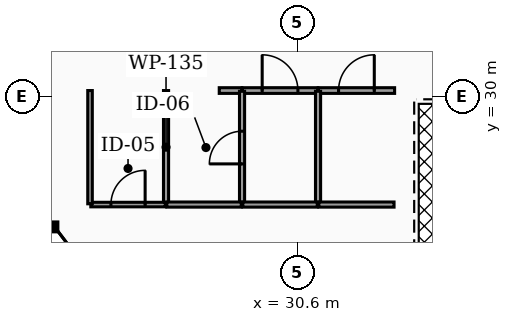
"""IFC4 building model, lengths in metres.
Left out: names, types, materials, properties, quantities, classifications, styles, units other than length and angle.
Written with IfcOpenShell. Run it as: python <this file> out.ifc"""

import sys

from ifc_helpers import new_model, si_unit, direction, frame, frame_2d, origin, place, context, subcontext, project, spatial, rectangle, extrude, element, fill, save


model = new_model("IFC4")
c1 = context("Model", 3, precision=1e-05, world=origin(), true_north=direction((0.0, 1.0)))
c2 = subcontext(c1, "Body", "Model", "MODEL_VIEW")
j1 = project(units=[si_unit("LENGTHUNIT", "METRE"), si_unit("PLANEANGLEUNIT", "RADIAN")], contexts=[c1])
p1 = place(None, origin())
s1 = spatial("IfcSite", under=j1, at=p1, CompositionType="ELEMENT")
p2 = place(p1, origin())
s2 = spatial("IfcBuilding", under=s1, at=p2, CompositionType="ELEMENT")
p3 = place(p2, frame((0.0, 0.0, 175.78)))
s3 = spatial("IfcBuildingStorey", under=s2, at=p3, CompositionType="ELEMENT", Elevation=175.78)
p4 = place(p3, frame((28.55, 30.15, 0.0), z_axis=(0.0, 0.0, 1.0), x_axis=(1.0, 0.0, 0.0)))
e1 = element("IfcWall", 1, at=p4, inside=s3, PredefinedType="PARTITIONING", context=c2, shape_type="SweptSolid", body=[
    extrude(rectangle(XDim=0.595, YDim=0.15, at=frame_2d((0.297, 0.0))), origin(), (0.0, 0.0, 1.0), 2.457),
])
p5 = place(p3, frame((29.155, 30.15, 0.0), z_axis=(0.0, 0.0, 1.0), x_axis=(1.0, 0.0, 0.0)))
e2 = element("IfcWall", 2, at=p5, inside=s3, PredefinedType="PARTITIONING", context=c2, shape_type="SweptSolid", body=[
    extrude(rectangle(XDim=1.99, YDim=0.15, at=frame_2d((0.995, 0.0))), origin(), (0.0, 0.0, 1.0), 2.457),
])
p6 = place(p5, frame((0.525, 0.0, 0.0)))
e3 = element("IfcOpeningElement", 3, at=p6, cuts=e2, PredefinedType="OPENING", context=c2, shape_type="SweptSolid", body=[
    extrude(rectangle(XDim=0.94, YDim=2.05, at=frame_2d((0.47, 1.025))), frame((0.0, 0.085, 0.0), z_axis=(0.0, -1.0, 0.0), x_axis=(1.0, 0.0, 0.0)), (0.0, 0.0, 1.0), 0.17),
])
p7 = place(p3, frame((31.155, 30.15, 0.0), z_axis=(0.0, 0.0, 1.0), x_axis=(1.0, 0.0, 0.0)))
e4 = element("IfcWall", 4, at=p7, inside=s3, PredefinedType="PARTITIONING", context=c2, shape_type="SweptSolid", body=[
    extrude(rectangle(XDim=2.01, YDim=0.15, at=frame_2d((1.005, 0.0))), origin(), (0.0, 0.0, 1.0), 2.457),
])
p8 = place(p7, frame((0.535, 0.0, 0.0)))
e5 = element("IfcOpeningElement", 5, at=p8, cuts=e4, PredefinedType="OPENING", context=c2, shape_type="SweptSolid", body=[
    extrude(rectangle(XDim=0.94, YDim=2.05, at=frame_2d((0.47, 1.025))), frame((0.0, 0.085, 0.0), z_axis=(0.0, -1.0, 0.0), x_axis=(1.0, 0.0, 0.0)), (0.0, 0.0, 1.0), 0.17),
])
p9 = place(p3, frame((27.15, 27.17, 0.0), z_axis=(0.0, 0.0, 1.0), x_axis=(0.0, 1.0, 0.0)))
e6 = element("IfcWall", 6, at=p9, inside=s3, PredefinedType="PARTITIONING", context=c2, shape_type="SweptSolid", body=[
    extrude(rectangle(XDim=2.98, YDim=0.135, at=frame_2d((1.49, 0.0))), origin(), (0.0, 0.0, 1.0), 2.457),
])
p10 = place(p3, frame((25.17, 27.15, 0.0), z_axis=(0.0, 0.0, 1.0), x_axis=(1.0, 0.0, 0.0)))
e7 = element("IfcWall", 7, at=p10, inside=s3, PredefinedType="PARTITIONING", context=c2, shape_type="SweptSolid", body=[
    extrude(rectangle(XDim=1.96, YDim=0.12, at=frame_2d((0.98, 0.0))), origin(), (0.0, 0.0, 1.0), 2.457),
])
p11 = place(p10, frame((0.53, 0.0, 0.0)))
e8 = element("IfcOpeningElement", 8, at=p11, cuts=e7, PredefinedType="OPENING", context=c2, shape_type="SweptSolid", body=[
    extrude(rectangle(XDim=0.9, YDim=2.05, at=frame_2d((0.45, 1.025))), frame((0.0, 0.07, 0.0), z_axis=(0.0, -1.0, 0.0), x_axis=(1.0, 0.0, 0.0)), (0.0, 0.0, 1.0), 0.14),
])
p12 = place(p3, frame((25.15, 27.17, 0.0), z_axis=(0.0, 0.0, 1.0), x_axis=(0.0, 1.0, 0.0)))
e9 = element("IfcWall", 9, at=p12, inside=s3, PredefinedType="PARTITIONING", context=c2, shape_type="SweptSolid", body=[
    extrude(rectangle(XDim=2.98, YDim=0.12, at=frame_2d((1.49, 0.0))), origin(), (0.0, 0.0, 1.0), 2.457),
])
p13 = place(p3, frame((29.15, 27.17, 0.0), z_axis=(0.0, 0.0, 1.0), x_axis=(0.0, 1.0, 0.0)))
e10 = element("IfcWall", 10, at=p13, inside=s3, PredefinedType="PARTITIONING", context=c2, shape_type="SweptSolid", body=[
    extrude(rectangle(XDim=2.96, YDim=0.135, at=frame_2d((1.48, 0.0))), origin(), (0.0, 0.0, 1.0), 2.457),
])
p14 = place(p13, frame((1.05, 0.0, 0.0)))
e11 = element("IfcOpeningElement", 11, at=p14, cuts=e10, PredefinedType="OPENING", context=c2, shape_type="SweptSolid", body=[
    extrude(rectangle(XDim=0.86, YDim=2.05, at=frame_2d((0.43, 1.025))), frame((0.0, 0.077, 0.0), z_axis=(0.0, -1.0, 0.0), x_axis=(1.0, 0.0, 0.0)), (0.0, 0.0, 1.0), 0.155),
])
p15 = place(p3, frame((27.17, 27.15, 0.0), z_axis=(0.0, 0.0, 1.0), x_axis=(1.0, 0.0, 0.0)))
e12 = element("IfcWall", 12, at=p15, inside=s3, PredefinedType="PARTITIONING", context=c2, shape_type="SweptSolid", body=[
    extrude(rectangle(XDim=1.96, YDim=0.135, at=frame_2d((0.98, 0.0))), origin(), (0.0, 0.0, 1.0), 2.457),
])
p16 = place(p3, frame((31.15, 27.17, 0.0), z_axis=(0.0, 0.0, 1.0), x_axis=(0.0, 1.0, 0.0)))
e13 = element("IfcWall", 13, at=p16, inside=s3, PredefinedType="PARTITIONING", context=c2, shape_type="SweptSolid", body=[
    extrude(rectangle(XDim=2.96, YDim=0.135, at=frame_2d((1.48, 0.0))), origin(), (0.0, 0.0, 1.0), 2.457),
])
p17 = place(p3, frame((29.17, 27.15, 0.0), z_axis=(0.0, 0.0, 1.0), x_axis=(1.0, 0.0, 0.0)))
e14 = element("IfcWall", 14, at=p17, inside=s3, PredefinedType="PARTITIONING", context=c2, shape_type="SweptSolid", body=[
    extrude(rectangle(XDim=1.96, YDim=0.135, at=frame_2d((0.98, 0.0))), origin(), (0.0, 0.0, 1.0), 2.457),
])
p18 = place(p3, frame((31.17, 27.15, 0.0), z_axis=(0.0, 0.0, 1.0), x_axis=(1.0, 0.0, 0.0)))
e15 = element("IfcWall", 15, at=p18, inside=s3, PredefinedType="PARTITIONING", context=c2, shape_type="SweptSolid", body=[
    extrude(rectangle(XDim=1.98, YDim=0.135, at=frame_2d((0.99, 0.0))), origin(), (0.0, 0.0, 1.0), 2.457),
])
p19 = place(p6, origin())
e16 = element("IfcDoor", 16, at=p19, inside=s3, OperationType="SINGLE_SWING_LEFT", PredefinedType="DOOR", context=c2, shape_type="SweptSolid", body=[
    extrude(rectangle(XDim=0.94, YDim=2.05, at=frame_2d((0.47, 1.025))), frame((0.0, 0.025, 0.0), z_axis=(0.0, -1.0, 0.0), x_axis=(1.0, 0.0, 0.0)), (0.0, 0.0, 1.0), 0.05),
])
fill(e3, e16)
p20 = place(p8, origin())
e17 = element("IfcDoor", 17, at=p20, inside=s3, OperationType="SINGLE_SWING_RIGHT", PredefinedType="DOOR", context=c2, shape_type="SweptSolid", body=[
    extrude(rectangle(XDim=0.94, YDim=2.05, at=frame_2d((0.47, 1.025))), frame((0.0, 0.025, 0.0), z_axis=(0.0, -1.0, 0.0), x_axis=(1.0, 0.0, 0.0)), (0.0, 0.0, 1.0), 0.05),
])
fill(e5, e17)
p21 = place(p11, origin())
e18 = element("IfcDoor", 18, at=p21, inside=s3, OperationType="SINGLE_SWING_RIGHT", PredefinedType="DOOR", context=c2, shape_type="SweptSolid", body=[
    extrude(rectangle(XDim=0.9, YDim=2.05, at=frame_2d((0.45, 1.025))), frame((0.0, 0.025, 0.0), z_axis=(0.0, -1.0, 0.0), x_axis=(1.0, 0.0, 0.0)), (0.0, 0.0, 1.0), 0.05),
])
fill(e8, e18)
p22 = place(p14, origin())
e19 = element("IfcDoor", 19, at=p22, inside=s3, OperationType="SINGLE_SWING_LEFT", PredefinedType="DOOR", context=c2, shape_type="SweptSolid", body=[
    extrude(rectangle(XDim=0.86, YDim=2.05, at=frame_2d((0.43, 1.025))), frame((0.0, 0.025, 0.0), z_axis=(0.0, -1.0, 0.0), x_axis=(1.0, 0.0, 0.0)), (0.0, 0.0, 1.0), 0.05),
])
fill(e11, e19)
save(model, sys.argv[1])
